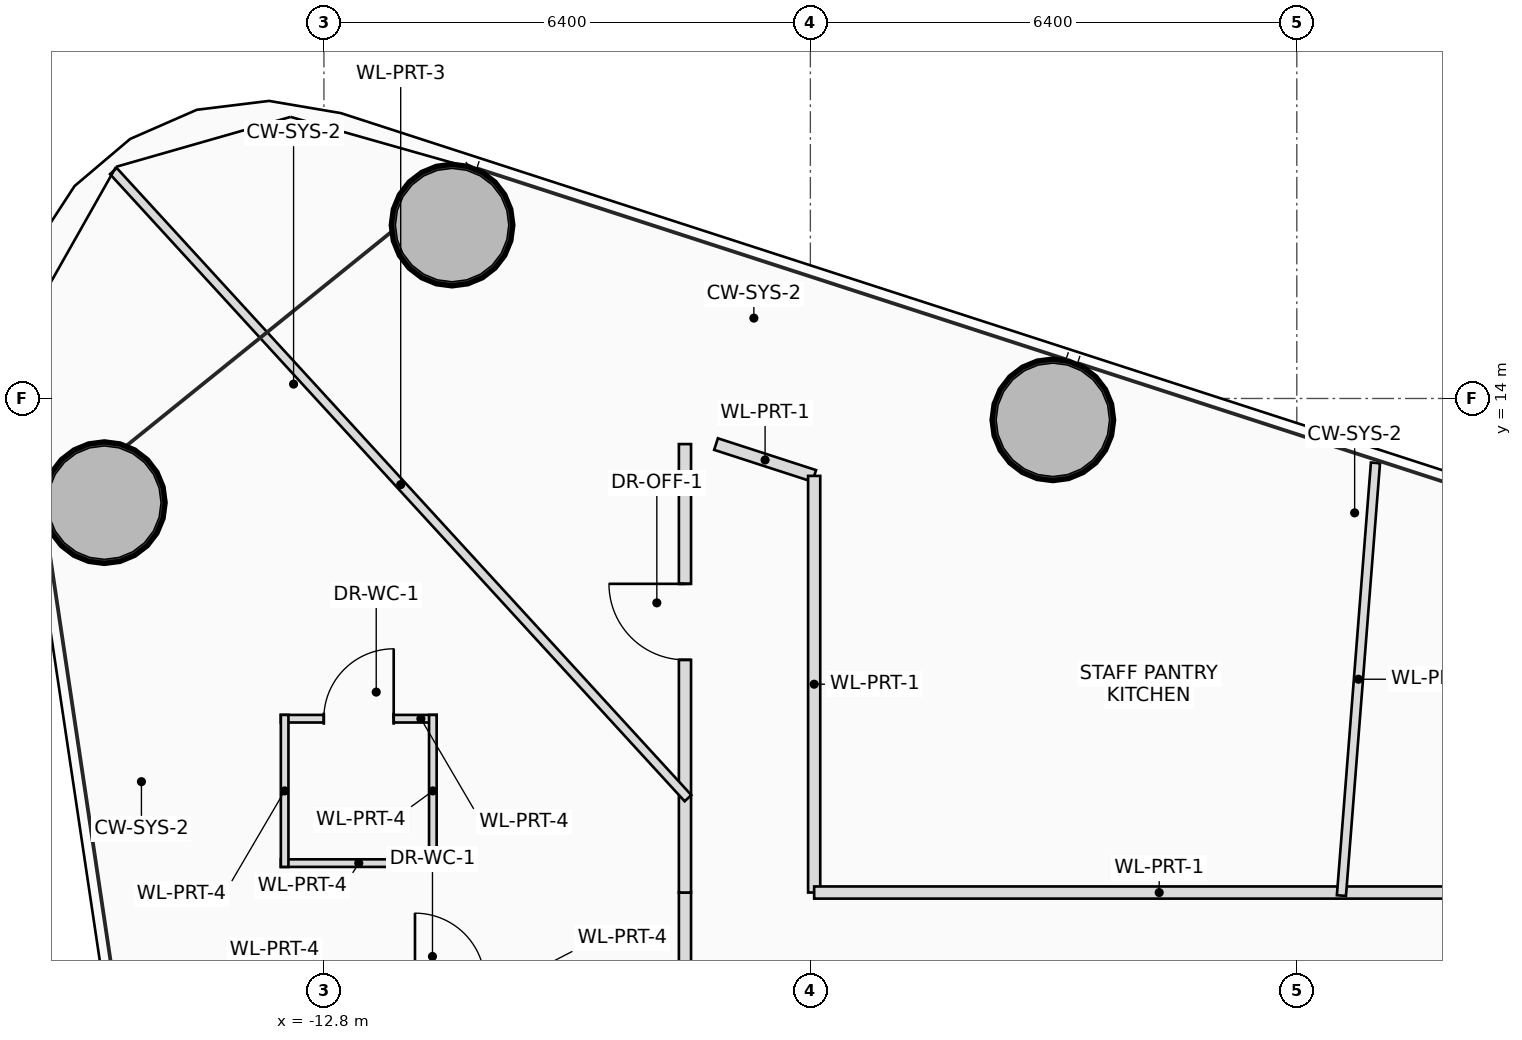
"""IFC4 building model, lengths in metres.
Left out: names, types, materials, properties, quantities, classifications, styles, units other than length and angle.
Written with IfcOpenShell. Run it as: python <this file> out.ifc"""

import sys

from ifc_helpers import new_model, si_unit, direction, frame, frame_2d, origin, origin_2d, place, context, subcontext, project, spatial, rectangle, hollow_circle, extrude, source, transform, mapped, element, fill, save


model = new_model("IFC4")
c1 = context("Model", 3, precision=1e-05, world=origin(), true_north=direction((0.0, 1.0)))
c2 = subcontext(c1, "Body", "Model", "MODEL_VIEW")
j1 = project(units=[si_unit("LENGTHUNIT", "METRE"), si_unit("PLANEANGLEUNIT", "RADIAN")], contexts=[c1])
p1 = place(None, origin())
s1 = spatial("IfcSite", under=j1, at=p1, CompositionType="ELEMENT")
p2 = place(p1, origin())
s2 = spatial("IfcBuilding", under=s1, at=p2, CompositionType="ELEMENT")
p3 = place(p2, frame((0.0, 0.0, 58.55)))
s3 = spatial("IfcBuildingStorey", under=s2, at=p3, CompositionType="ELEMENT", Elevation=58.55)
m1 = source(origin(), c2, "Body", "SweptSolid", [
    extrude(hollow_circle(Radius=0.8, WallThickness=0.055, at=origin_2d()), origin(), (0.0, 0.0, 1.0), 3.75),
])
for number, where, z_axis, x_axis in (
    (1, (-3.21, 13.719, 0.0), (0.0, 0.0, 1.0), (1.0, 0.0, 0.0)),
    (2, (-11.114, 16.281, 0.0), (0.0, 0.0, 1.0), (1.0, 0.0, 0.0)),
    (3, (-15.689, 12.629, 0.0), (0.0, 0.0, 1.0), (1.0, 0.0, 0.0)),
):
    element("IfcColumn", number, at=place(p3, frame(where, z_axis=z_axis, x_axis=x_axis)), inside=s3, PredefinedType="COLUMN", context=c2, shape_type="MappedRepresentation", body=[
        mapped(m1, transform((0.0, 0.0, 0.0), scale=1.0)),
    ])
p4 = place(p3, frame((-13.367, 9.787, 0.0), z_axis=(0.0, 0.0, 1.0), x_axis=(1.0, 0.0, 0.0)))
e4 = element("IfcWall", 4, at=p4, inside=s3, PredefinedType="PARTITIONING", context=c2, shape_type="SweptSolid", body=[
    extrude(rectangle(XDim=2.05, YDim=0.1, at=frame_2d((1.025, 0.0))), origin(), (0.0, 0.0, 1.0), 2.85),
])
p5 = place(p4, frame((0.565, 0.0, 0.0)))
e5 = element("IfcOpeningElement", 5, at=p5, cuts=e4, PredefinedType="OPENING", context=c2, shape_type="SweptSolid", body=[
    extrude(rectangle(XDim=0.92, YDim=2.1, at=frame_2d((0.46, 1.05))), frame((0.0, 0.06, 0.0), z_axis=(0.0, -1.0, 0.0), x_axis=(1.0, 0.0, 0.0)), (0.0, 0.0, 1.0), 0.12),
])
p6 = place(p3, frame((-11.317, 7.887, 0.0), z_axis=(0.0, 0.0, 1.0), x_axis=(-1.0, 0.0, 0.0)))
e6 = element("IfcWall", 6, at=p6, inside=s3, PredefinedType="PARTITIONING", context=c2, shape_type="SweptSolid", body=[
    extrude(rectangle(XDim=2.05, YDim=0.1, at=frame_2d((1.025, 0.0))), origin(), (0.0, 0.0, 1.0), 3.2),
])
p7 = place(p3, frame((-11.367, 9.837, 0.0), z_axis=(0.0, 0.0, 1.0), x_axis=(0.0, -1.0, 0.0)))
e7 = element("IfcWall", 7, at=p7, inside=s3, PredefinedType="PARTITIONING", context=c2, shape_type="SweptSolid", body=[
    extrude(rectangle(XDim=2.0, YDim=0.1, at=frame_2d((1.0, 0.0))), origin(), (0.0, 0.0, 1.0), 2.85),
])
p8 = place(p3, frame((-13.317, 7.837, 0.0), z_axis=(0.0, 0.0, 1.0), x_axis=(0.0, 1.0, 0.0)))
e8 = element("IfcWall", 8, at=p8, inside=s3, PredefinedType="PARTITIONING", context=c2, shape_type="SweptSolid", body=[
    extrude(rectangle(XDim=2.0, YDim=0.1, at=frame_2d((1.0, 0.0))), origin(), (0.0, 0.0, 1.0), 3.545),
])
p9 = place(p3, frame((-8.05, -7.5, 0.0), z_axis=(0.0, 0.0, 1.0), x_axis=(0.0, 1.0, 0.0)))
e9 = element("IfcWall", 9, at=p9, inside=s3, PredefinedType="PARTITIONING", context=c2, shape_type="SweptSolid", body=[
    extrude(rectangle(XDim=15.0, YDim=0.16, at=frame_2d((7.5, 0.0))), origin(), (0.0, 0.0, 1.0), 2.85),
])
p10 = place(p9, frame((8.806, 0.0, 0.0)))
e10 = element("IfcOpeningElement", 10, at=p10, cuts=e9, PredefinedType="OPENING", context=c2, shape_type="SweptSolid", body=[
    extrude(rectangle(XDim=1.0, YDim=2.25, at=frame_2d((0.5, 1.125))), frame((0.0, 0.09, 0.0), z_axis=(0.0, -1.0, 0.0), x_axis=(1.0, 0.0, 0.0)), (0.0, 0.0, 1.0), 0.18),
])
p11 = place(p3, frame((-8.05, 7.5, 0.0), z_axis=(0.0, 0.0, 1.0), x_axis=(0.0, 1.0, 0.0)))
e11 = element("IfcWall", 11, at=p11, inside=s3, PredefinedType="PARTITIONING", context=c2, shape_type="SweptSolid", body=[
    extrude(rectangle(XDim=5.9, YDim=0.16, at=frame_2d((2.95, 0.0))), origin(), (0.0, 0.0, 1.0), 2.85),
])
p12 = place(p11, frame((3.061, 0.0, 0.0)))
e12 = element("IfcOpeningElement", 12, at=p12, cuts=e11, PredefinedType="OPENING", context=c2, shape_type="SweptSolid", body=[
    extrude(rectangle(XDim=1.0, YDim=2.25, at=frame_2d((0.5, 1.125))), frame((0.0, 0.09, 0.0), z_axis=(0.0, -1.0, 0.0), x_axis=(1.0, 0.0, 0.0)), (0.0, 0.0, 1.0), 0.18),
])
p13 = place(p3, frame((-7.641, 13.4, 0.0), z_axis=(0.0, 0.0, 1.0), x_axis=(0.951277022007, -0.308337521884, 0.0)))
e13 = element("IfcWall", 13, at=p13, inside=s3, PredefinedType="PARTITIONING", context=c2, shape_type="SweptSolid", body=[
    extrude(rectangle(XDim=1.357, YDim=0.16, at=frame_2d((0.679, 0.0))), origin(), (0.0, 0.0, 1.0), 3.545),
])
p14 = place(p3, frame((-6.35, 12.981, 0.0), z_axis=(0.0, 0.0, 1.0), x_axis=(0.0, -1.0, 0.0)))
e14 = element("IfcWall", 14, at=p14, inside=s3, PredefinedType="PARTITIONING", context=c2, shape_type="SweptSolid", body=[
    extrude(rectangle(XDim=5.481, YDim=0.16, at=frame_2d((2.741, 0.0))), origin(), (0.0, 0.0, 1.0), 3.05),
])
p15 = place(p3, frame((-6.35, 7.5, 0.0), z_axis=(0.0, 0.0, 1.0), x_axis=(1.0, 0.0, 0.0)))
e15 = element("IfcWall", 15, at=p15, inside=s3, PredefinedType="PARTITIONING", context=c2, shape_type="SweptSolid", body=[
    extrude(rectangle(XDim=12.7, YDim=0.16, at=frame_2d((6.35, 0.0))), origin(), (0.0, 0.0, 1.0), 2.85),
])
p16 = place(p15, frame((9.229, 0.0, 0.0)))
e16 = element("IfcOpeningElement", 16, at=p16, cuts=e15, PredefinedType="OPENING", context=c2, shape_type="SweptSolid", body=[
    extrude(rectangle(XDim=1.0, YDim=2.25, at=frame_2d((0.5, 1.125))), frame((0.0, 0.09, 0.0), z_axis=(0.0, -1.0, 0.0), x_axis=(1.0, 0.0, 0.0)), (0.0, 0.0, 1.0), 0.18),
])
p17 = place(p3, frame((0.587, 7.46, 0.0), z_axis=(0.0, 0.0, 1.0), x_axis=(0.078455369282, 0.996917627004, 0.0)))
e17 = element("IfcWall", 17, at=p17, inside=s3, PredefinedType="PARTITIONING", context=c2, shape_type="SweptSolid", body=[
    extrude(rectangle(XDim=5.71, YDim=0.12, at=frame_2d((2.855, 0.0))), origin(), (0.0, 0.0, 1.0), 3.01),
])
p18 = place(p3, frame((-8.01, 8.741, 0.0), z_axis=(0.0, 0.0, 1.0), x_axis=(-0.675595196102, 0.737272765674, 0.0)))
e18 = element("IfcWall", 18, at=p18, inside=s3, PredefinedType="PARTITIONING", context=c2, shape_type="SweptSolid", body=[
    extrude(rectangle(XDim=11.19, YDim=0.12, at=frame_2d((5.595, 0.0))), origin(), (0.0, 0.0, 1.0), 3.01),
])
p19 = place(p5, origin())
e19 = element("IfcDoor", 19, at=p19, inside=s3, OperationType="SINGLE_SWING_RIGHT", PredefinedType="DOOR", context=c2, shape_type="SweptSolid", body=[
    extrude(rectangle(XDim=0.92, YDim=2.1, at=frame_2d((0.46, 1.05))), frame((0.0, 0.025, 0.0), z_axis=(0.0, -1.0, 0.0), x_axis=(1.0, 0.0, 0.0)), (0.0, 0.0, 1.0), 0.05),
])
fill(e5, e19)
p20 = place(p12, origin())
e20 = element("IfcDoor", 20, at=p20, inside=s3, OperationType="SINGLE_SWING_RIGHT", PredefinedType="DOOR", context=c2, shape_type="SweptSolid", body=[
    extrude(rectangle(XDim=1.0, YDim=2.25, at=frame_2d((0.5, 1.125))), frame((0.0, 0.025, 0.0), z_axis=(0.0, -1.0, 0.0), x_axis=(1.0, 0.0, 0.0)), (0.0, 0.0, 1.0), 0.05),
])
fill(e12, e20)
save(model, sys.argv[1])
